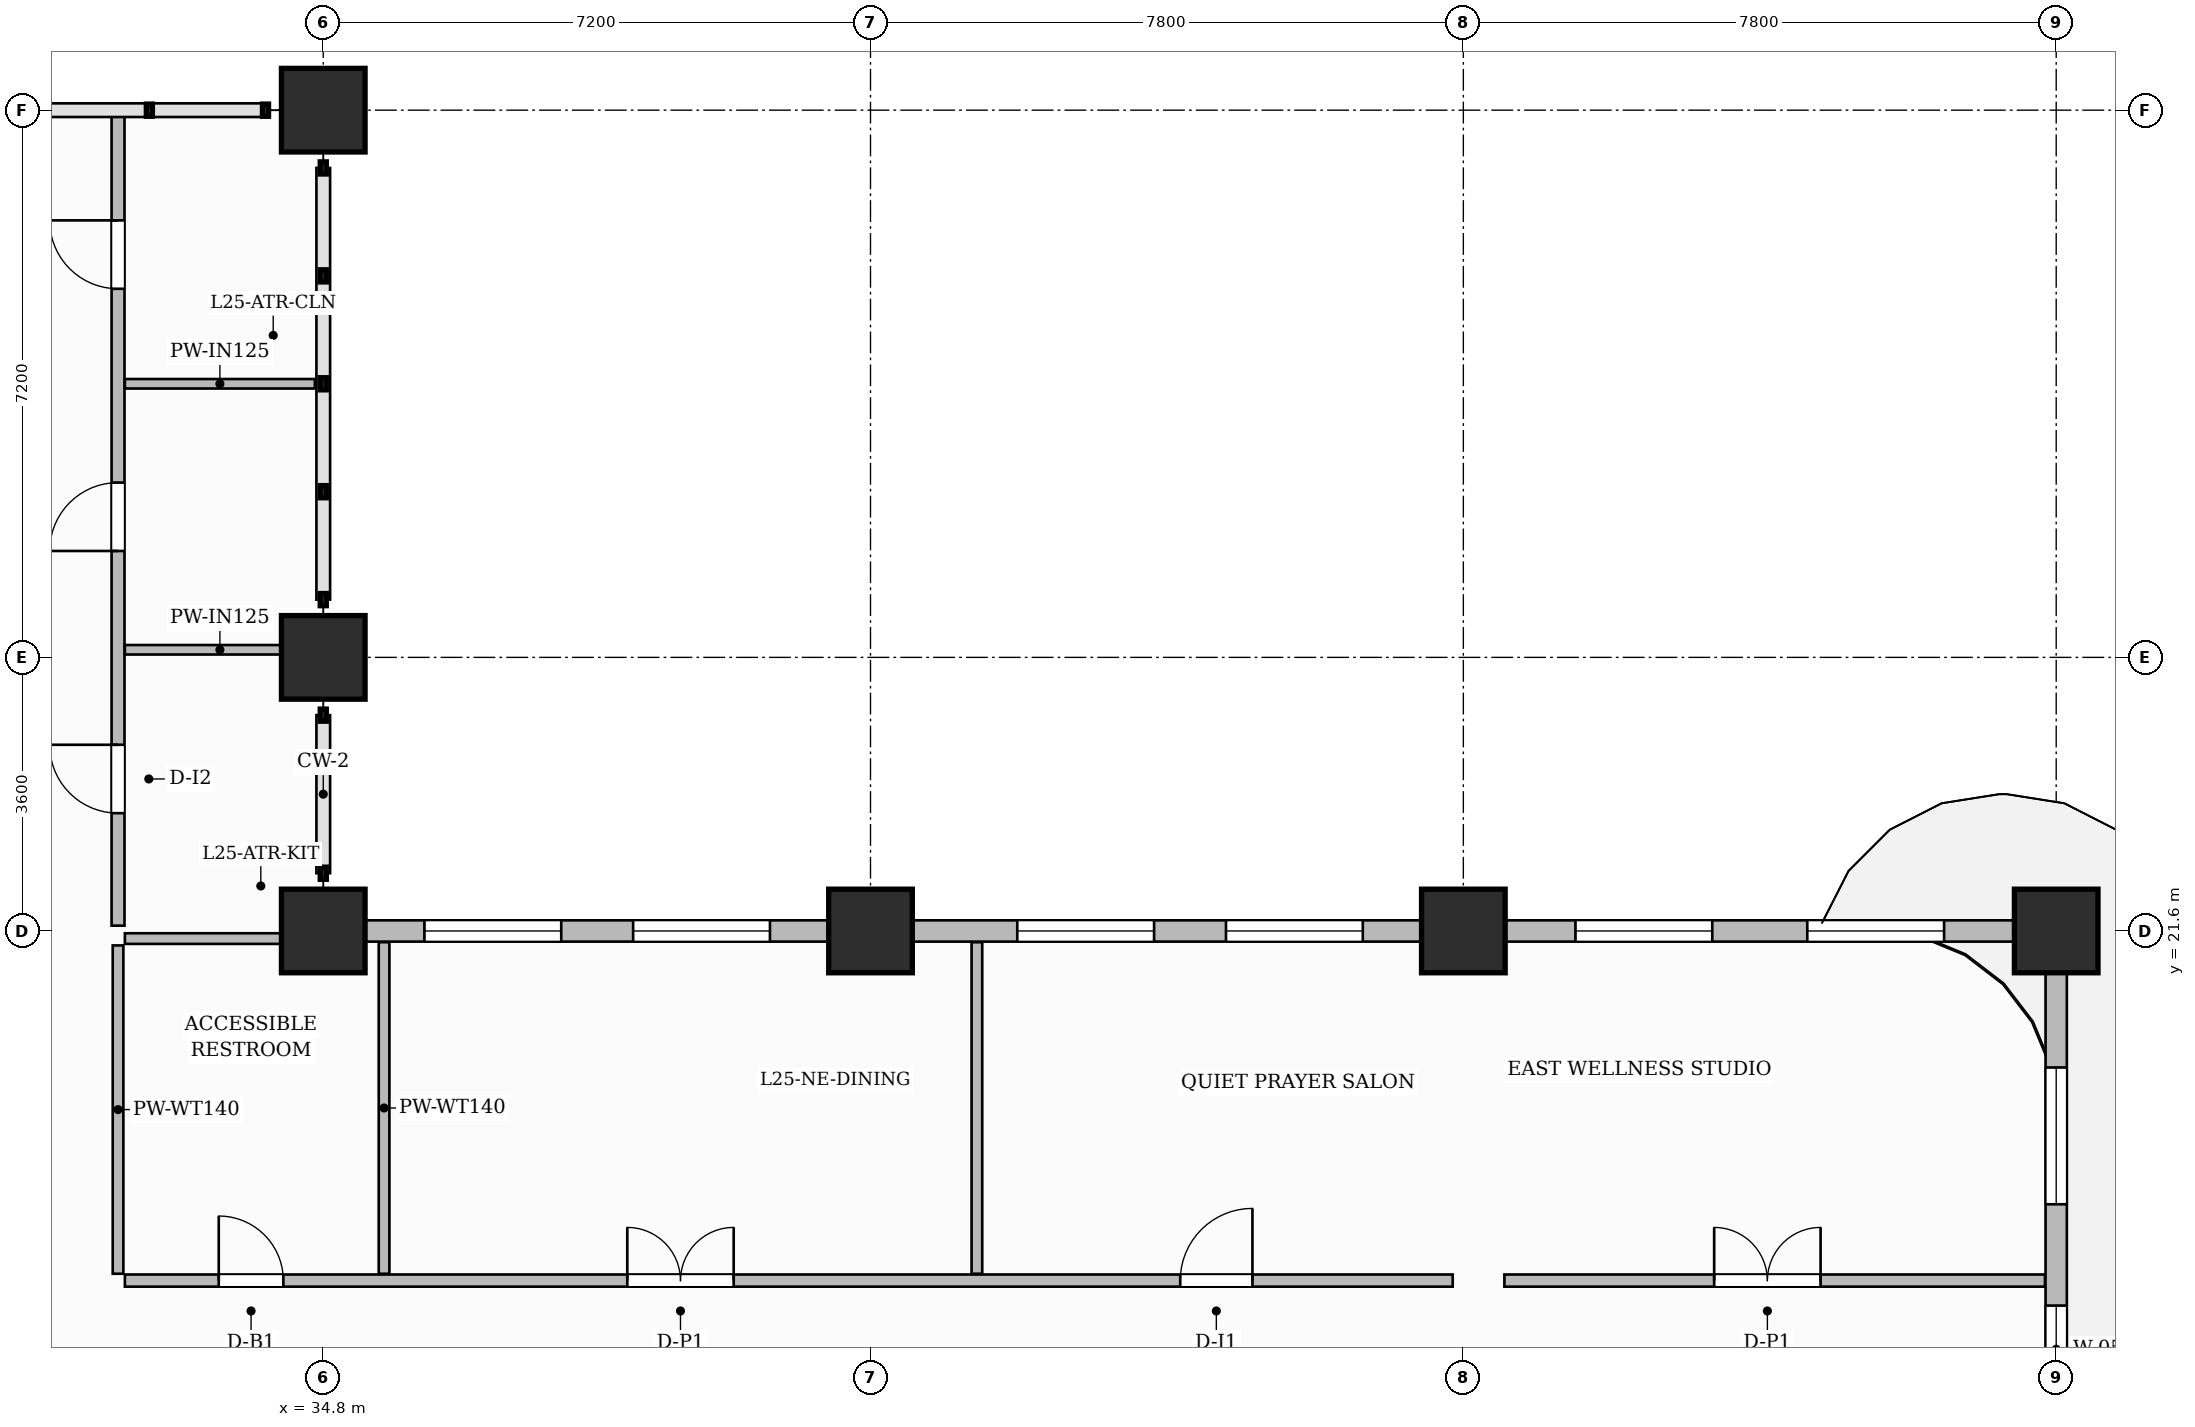
"""IFC4 building model, lengths in metres.
Left out: names, types, materials, properties, quantities, classifications, styles, units other than length and angle.
Written with IfcOpenShell. Run it as: python <this file> out.ifc"""

import sys

from ifc_helpers import new_model, si_unit, direction, frame, frame_2d, origin, origin_2d, place, context, subcontext, project, spatial, rectangle, extrude, source, transform, mapped, element, fill, save


model = new_model("IFC4")
c1 = context("Model", 3, precision=1e-05, world=origin(), true_north=direction((0.0, 1.0)))
c2 = subcontext(c1, "Body", "Model", "MODEL_VIEW")
j1 = project(units=[si_unit("LENGTHUNIT", "METRE"), si_unit("PLANEANGLEUNIT", "RADIAN")], contexts=[c1])
p1 = place(None, origin())
s1 = spatial("IfcSite", under=j1, at=p1, CompositionType="ELEMENT")
p2 = place(p1, origin())
s2 = spatial("IfcBuilding", under=s1, at=p2, CompositionType="ELEMENT")
p3 = place(p2, frame((0.0, 0.0, 102.7)))
s3 = spatial("IfcBuildingStorey", under=s2, at=p3, CompositionType="ELEMENT", Elevation=102.7)
m1 = source(origin(), c2, "Body", "SweptSolid", [
    extrude(rectangle(XDim=1.1, YDim=1.1, at=origin_2d()), origin(), (0.0, 0.0, 1.0), 3.7),
])
for number, where, z_axis, x_axis in (
    (1, (34.8, 21.6, 0.0), (0.0, 0.0, 1.0), (1.0, 0.0, 0.0)),
    (2, (34.8, 25.2, 0.0), (0.0, 0.0, 1.0), (1.0, 0.0, 0.0)),
    (3, (34.8, 32.4, 0.0), (0.0, 0.0, 1.0), (1.0, 0.0, 0.0)),
    (4, (42.0, 21.6, 0.0), (0.0, 0.0, 1.0), (1.0, 0.0, 0.0)),
    (5, (49.8, 21.6, 0.0), (0.0, 0.0, 1.0), (1.0, 0.0, 0.0)),
    (6, (57.6, 21.6, 0.0), (0.0, 0.0, 1.0), (1.0, 0.0, 0.0)),
):
    element("IfcColumn", number, at=place(p3, frame(where, z_axis=z_axis, x_axis=x_axis)), inside=s3, PredefinedType="COLUMN", context=c2, shape_type="MappedRepresentation", body=[
        mapped(m1, transform((0.0, 0.0, 0.0), scale=1.0)),
    ])
p4 = place(p3, frame((32.19, 17.0, 0.0), z_axis=(0.0, 0.0, 1.0), x_axis=(1.0, 0.0, 0.0)))
e7 = element("IfcWall", 7, at=p4, inside=s3, PredefinedType="PARTITIONING", context=c2, shape_type="SweptSolid", body=[
    extrude(rectangle(XDim=17.47, YDim=0.16, at=frame_2d((8.735, 0.0))), origin(), (0.0, 0.0, 1.0), 3.4),
])
p5 = place(p4, frame((1.235, 0.0, 0.0)))
e8 = element("IfcOpeningElement", 8, at=p5, cuts=e7, PredefinedType="OPENING", context=c2, shape_type="SweptSolid", body=[
    extrude(rectangle(XDim=0.85, YDim=2.1, at=frame_2d((0.425, 1.05))), frame((0.0, 0.09, 0.0), z_axis=(0.0, -1.0, 0.0), x_axis=(1.0, 0.0, 0.0)), (0.0, 0.0, 1.0), 0.18),
])
p6 = place(p4, frame((6.61, 0.0, 0.0)))
e9 = element("IfcOpeningElement", 9, at=p6, cuts=e7, PredefinedType="OPENING", context=c2, shape_type="SweptSolid", body=[
    extrude(rectangle(XDim=1.4, YDim=2.35, at=frame_2d((0.7, 1.175))), frame((0.0, 0.09, 0.0), z_axis=(0.0, -1.0, 0.0), x_axis=(1.0, 0.0, 0.0)), (0.0, 0.0, 1.0), 0.18),
])
p7 = place(p4, frame((13.885, 0.0, 0.0)))
e10 = element("IfcOpeningElement", 10, at=p7, cuts=e7, PredefinedType="OPENING", context=c2, shape_type="SweptSolid", body=[
    extrude(rectangle(XDim=0.95, YDim=2.15, at=frame_2d((0.475, 1.075))), frame((0.0, 0.09, 0.0), z_axis=(0.0, -1.0, 0.0), x_axis=(1.0, 0.0, 0.0)), (0.0, 0.0, 1.0), 0.18),
])
p8 = place(p3, frame((50.34, 17.0, 0.0), z_axis=(0.0, 0.0, 1.0), x_axis=(1.0, 0.0, 0.0)))
e11 = element("IfcWall", 11, at=p8, inside=s3, PredefinedType="PARTITIONING", context=c2, shape_type="SweptSolid", body=[
    extrude(rectangle(XDim=7.112, YDim=0.16, at=frame_2d((3.556, 0.0))), origin(), (0.0, 0.0, 1.0), 3.4),
])
p9 = place(p8, frame((2.76, 0.0, 0.0)))
e12 = element("IfcOpeningElement", 12, at=p9, cuts=e11, PredefinedType="OPENING", context=c2, shape_type="SweptSolid", body=[
    extrude(rectangle(XDim=1.4, YDim=2.35, at=frame_2d((0.7, 1.175))), frame((0.0, 0.09, 0.0), z_axis=(0.0, -1.0, 0.0), x_axis=(1.0, 0.0, 0.0)), (0.0, 0.0, 1.0), 0.18),
])
p10 = place(p3, frame((32.1, 17.09, 0.0), z_axis=(0.0, 0.0, 1.0), x_axis=(0.0, 1.0, 0.0)))
e13 = element("IfcWall", 13, at=p10, inside=s3, PredefinedType="PARTITIONING", context=c2, shape_type="SweptSolid", body=[
    extrude(rectangle(XDim=4.32, YDim=0.14, at=frame_2d((2.16, 0.0))), origin(), (0.0, 0.0, 1.0), 3.4),
])
for number, where, z_axis, x_axis in (
    (14, (35.6, 17.09, 0.0), (0.0, 0.0, 1.0), (0.0, 1.0, 0.0)),
    (15, (43.4, 17.09, 0.0), (0.0, 0.0, 1.0), (0.0, 1.0, 0.0)),
):
    element("IfcWall", number, at=place(p3, frame(where, z_axis=z_axis, x_axis=x_axis)), inside=s3, PredefinedType="PARTITIONING", context=c2, shape_type="SweptSolid", body=[
        extrude(rectangle(XDim=4.362, YDim=0.14, at=frame_2d((2.181, 0.0))), origin(), (0.0, 0.0, 1.0), 3.4),
    ])
p11 = place(p3, frame((32.19, 21.5, 0.0), z_axis=(0.0, 0.0, 1.0), x_axis=(1.0, 0.0, 0.0)))
e16 = element("IfcWall", 16, at=p11, inside=s3, PredefinedType="PARTITIONING", context=c2, shape_type="SweptSolid", body=[
    extrude(rectangle(XDim=2.42, YDim=0.14, at=frame_2d((1.21, 0.0))), origin(), (0.0, 0.0, 1.0), 2.835),
])
p12 = place(p3, frame((32.1, 21.67, 0.0), z_axis=(0.0, 0.0, 1.0), x_axis=(0.0, 1.0, 0.0)))
e17 = element("IfcWall", 17, at=p12, inside=s3, PredefinedType="PARTITIONING", context=c2, shape_type="SweptSolid", body=[
    extrude(rectangle(XDim=10.702, YDim=0.17, at=frame_2d((5.351, 0.0))), origin(), (0.0, 0.0, 1.0), 3.4),
])
p13 = place(p12, frame((1.48, 0.0, 0.0)))
e18 = element("IfcOpeningElement", 18, at=p13, cuts=e17, PredefinedType="OPENING", context=c2, shape_type="SweptSolid", body=[
    extrude(rectangle(XDim=0.9, YDim=2.15, at=frame_2d((0.45, 1.075))), frame((0.0, 0.095, 0.0), z_axis=(0.0, -1.0, 0.0), x_axis=(1.0, 0.0, 0.0)), (0.0, 0.0, 1.0), 0.19),
])
p14 = place(p12, frame((4.93, 0.0, 0.0)))
e19 = element("IfcOpeningElement", 19, at=p14, cuts=e17, PredefinedType="OPENING", context=c2, shape_type="SweptSolid", body=[
    extrude(rectangle(XDim=0.9, YDim=2.15, at=frame_2d((0.45, 1.075))), frame((0.0, 0.095, 0.0), z_axis=(0.0, -1.0, 0.0), x_axis=(1.0, 0.0, 0.0)), (0.0, 0.0, 1.0), 0.19),
])
p15 = place(p12, frame((8.38, 0.0, 0.0)))
e20 = element("IfcOpeningElement", 20, at=p15, cuts=e17, PredefinedType="OPENING", context=c2, shape_type="SweptSolid", body=[
    extrude(rectangle(XDim=0.9, YDim=2.15, at=frame_2d((0.45, 1.075))), frame((0.0, 0.095, 0.0), z_axis=(0.0, -1.0, 0.0), x_axis=(1.0, 0.0, 0.0)), (0.0, 0.0, 1.0), 0.19),
])
for number, where, z_axis, x_axis in (
    (21, (32.19, 25.3, 0.0), (0.0, 0.0, 1.0), (1.0, 0.0, 0.0)),
    (22, (32.19, 28.8, 0.0), (0.0, 0.0, 1.0), (1.0, 0.0, 0.0)),
):
    element("IfcWall", number, at=place(p3, frame(where, z_axis=z_axis, x_axis=x_axis)), inside=s3, PredefinedType="PARTITIONING", context=c2, shape_type="SweptSolid", body=[
        extrude(rectangle(XDim=2.5, YDim=0.125, at=frame_2d((1.25, 0.0))), origin(), (0.0, 0.0, 1.0), 3.4),
    ])
p16 = place(p3, frame((57.6, 0.05, 0.0), z_axis=(0.0, 0.0, 1.0), x_axis=(0.0, 1.0, 0.0)))
e23 = element("IfcWall", 23, at=p16, inside=s3, PredefinedType="SOLIDWALL", context=c2, shape_type="SweptSolid", body=[
    extrude(rectangle(XDim=21.5, YDim=0.28, at=frame_2d((10.75, 0.0))), origin(), (0.0, 0.0, 1.0), 2.835),
])
p17 = place(p16, frame((2.75, 0.0, 0.0)))
e24 = element("IfcOpeningElement", 24, at=p17, cuts=e23, PredefinedType="OPENING", context=c2, shape_type="SweptSolid", body=[
    extrude(rectangle(XDim=1.2, YDim=2.2, at=frame_2d((0.6, 1.1))), frame((0.0, 0.15, 0.0), z_axis=(0.0, -1.0, 0.0), x_axis=(1.0, 0.0, 0.0)), (0.0, 0.0, 1.0), 0.3),
])
p18 = place(p16, frame((1.025, 0.0, 0.8)))
e25 = element("IfcOpeningElement", 25, at=p18, cuts=e23, PredefinedType="OPENING", context=c2, shape_type="SweptSolid", body=[
    extrude(rectangle(XDim=1.15, YDim=1.8, at=frame_2d((0.575, 0.9))), frame((0.0, 0.15, 0.0), z_axis=(0.0, -1.0, 0.0), x_axis=(1.0, 0.0, 0.0)), (0.0, 0.0, 1.0), 0.3),
])
p19 = place(p16, frame((4.6, 0.0, 0.8)))
e26 = element("IfcOpeningElement", 26, at=p19, cuts=e23, PredefinedType="OPENING", context=c2, shape_type="SweptSolid", body=[
    extrude(rectangle(XDim=1.4, YDim=1.85, at=frame_2d((0.7, 0.925))), frame((0.0, 0.15, 0.0), z_axis=(0.0, -1.0, 0.0), x_axis=(1.0, 0.0, 0.0)), (0.0, 0.0, 1.0), 0.3),
])
p20 = place(p16, frame((8.475, 0.0, 0.8)))
e27 = element("IfcOpeningElement", 27, at=p20, cuts=e23, PredefinedType="OPENING", context=c2, shape_type="SweptSolid", body=[
    extrude(rectangle(XDim=1.8, YDim=1.85, at=frame_2d((0.9, 0.925))), frame((0.0, 0.15, 0.0), z_axis=(0.0, -1.0, 0.0), x_axis=(1.0, 0.0, 0.0)), (0.0, 0.0, 1.0), 0.3),
])
p21 = place(p16, frame((11.225, 0.0, 0.8)))
e28 = element("IfcOpeningElement", 28, at=p21, cuts=e23, PredefinedType="OPENING", context=c2, shape_type="SweptSolid", body=[
    extrude(rectangle(XDim=1.8, YDim=1.85, at=frame_2d((0.9, 0.925))), frame((0.0, 0.15, 0.0), z_axis=(0.0, -1.0, 0.0), x_axis=(1.0, 0.0, 0.0)), (0.0, 0.0, 1.0), 0.3),
])
p22 = place(p16, frame((15.471, 0.0, 0.8)))
e29 = element("IfcOpeningElement", 29, at=p22, cuts=e23, PredefinedType="OPENING", context=c2, shape_type="SweptSolid", body=[
    extrude(rectangle(XDim=1.15, YDim=1.8, at=frame_2d((0.575, 0.9))), frame((0.0, 0.15, 0.0), z_axis=(0.0, -1.0, 0.0), x_axis=(1.0, 0.0, 0.0)), (0.0, 0.0, 1.0), 0.3),
])
p23 = place(p16, frame((17.954, 0.0, 0.8)))
e30 = element("IfcOpeningElement", 30, at=p23, cuts=e23, PredefinedType="OPENING", context=c2, shape_type="SweptSolid", body=[
    extrude(rectangle(XDim=1.8, YDim=1.85, at=frame_2d((0.9, 0.925))), frame((0.0, 0.15, 0.0), z_axis=(0.0, -1.0, 0.0), x_axis=(1.0, 0.0, 0.0)), (0.0, 0.0, 1.0), 0.3),
])
p24 = place(p3, frame((34.8, 21.6, 0.0), z_axis=(0.0, 0.0, 1.0), x_axis=(1.0, 0.0, 0.0)))
e31 = element("IfcWall", 31, at=p24, inside=s3, PredefinedType="SOLIDWALL", context=c2, shape_type="SweptSolid", body=[
    extrude(rectangle(XDim=22.8, YDim=0.28, at=frame_2d((11.4, 0.0))), origin(), (0.0, 0.0, 1.0), 2.835),
])
p25 = place(p24, frame((1.331, 0.0, 0.8)))
e32 = element("IfcOpeningElement", 32, at=p25, cuts=e31, PredefinedType="OPENING", context=c2, shape_type="SweptSolid", body=[
    extrude(rectangle(XDim=1.8, YDim=1.85, at=frame_2d((0.9, 0.925))), frame((0.0, 0.15, 0.0), z_axis=(0.0, -1.0, 0.0), x_axis=(1.0, 0.0, 0.0)), (0.0, 0.0, 1.0), 0.3),
])
p26 = place(p24, frame((4.077, 0.0, 0.8)))
e33 = element("IfcOpeningElement", 33, at=p26, cuts=e31, PredefinedType="OPENING", context=c2, shape_type="SweptSolid", body=[
    extrude(rectangle(XDim=1.8, YDim=1.85, at=frame_2d((0.9, 0.925))), frame((0.0, 0.15, 0.0), z_axis=(0.0, -1.0, 0.0), x_axis=(1.0, 0.0, 0.0)), (0.0, 0.0, 1.0), 0.3),
])
p27 = place(p24, frame((9.131, 0.0, 0.8)))
e34 = element("IfcOpeningElement", 34, at=p27, cuts=e31, PredefinedType="OPENING", context=c2, shape_type="SweptSolid", body=[
    extrude(rectangle(XDim=1.8, YDim=1.85, at=frame_2d((0.9, 0.925))), frame((0.0, 0.15, 0.0), z_axis=(0.0, -1.0, 0.0), x_axis=(1.0, 0.0, 0.0)), (0.0, 0.0, 1.0), 0.3),
])
p28 = place(p24, frame((11.877, 0.0, 0.8)))
e35 = element("IfcOpeningElement", 35, at=p28, cuts=e31, PredefinedType="OPENING", context=c2, shape_type="SweptSolid", body=[
    extrude(rectangle(XDim=1.8, YDim=1.85, at=frame_2d((0.9, 0.925))), frame((0.0, 0.15, 0.0), z_axis=(0.0, -1.0, 0.0), x_axis=(1.0, 0.0, 0.0)), (0.0, 0.0, 1.0), 0.3),
])
p29 = place(p24, frame((16.475, 0.0, 0.8)))
e36 = element("IfcOpeningElement", 36, at=p29, cuts=e31, PredefinedType="OPENING", context=c2, shape_type="SweptSolid", body=[
    extrude(rectangle(XDim=1.8, YDim=1.85, at=frame_2d((0.9, 0.925))), frame((0.0, 0.15, 0.0), z_axis=(0.0, -1.0, 0.0), x_axis=(1.0, 0.0, 0.0)), (0.0, 0.0, 1.0), 0.3),
])
p30 = place(p24, frame((19.525, 0.0, 0.8)))
e37 = element("IfcOpeningElement", 37, at=p30, cuts=e31, PredefinedType="OPENING", context=c2, shape_type="SweptSolid", body=[
    extrude(rectangle(XDim=1.8, YDim=1.85, at=frame_2d((0.9, 0.925))), frame((0.0, 0.15, 0.0), z_axis=(0.0, -1.0, 0.0), x_axis=(1.0, 0.0, 0.0)), (0.0, 0.0, 1.0), 0.3),
])
m2 = source(origin(), c2, "Body", "SweptSolid", [
    extrude(rectangle(XDim=1.4, YDim=2.35, at=frame_2d((0.7, 1.175))), frame((0.0, 0.025, 0.0), z_axis=(0.0, -1.0, 0.0), x_axis=(1.0, 0.0, 0.0)), (0.0, 0.0, 1.0), 0.05),
])
p31 = place(p9, origin())
e38 = element("IfcDoor", 38, at=p31, inside=s3, OperationType="DOUBLE_DOOR_SINGLE_SWING", PredefinedType="DOOR", context=c2, shape_type="MappedRepresentation", body=[
    mapped(m2, transform((0.0, 0.0, 0.0), scale=1.0)),
])
fill(e12, e38)
m3 = source(origin(), c2, "Body", "SweptSolid", [
    extrude(rectangle(XDim=0.85, YDim=2.1, at=frame_2d((0.425, 1.05))), frame((0.0, 0.025, 0.0), z_axis=(0.0, -1.0, 0.0), x_axis=(1.0, 0.0, 0.0)), (0.0, 0.0, 1.0), 0.05),
])
p32 = place(p5, origin())
e39 = element("IfcDoor", 39, at=p32, inside=s3, OperationType="SINGLE_SWING_LEFT", PredefinedType="DOOR", context=c2, shape_type="MappedRepresentation", body=[
    mapped(m3, transform((0.0, 0.0, 0.0), scale=1.0)),
])
fill(e8, e39)
p33 = place(p6, origin())
e40 = element("IfcDoor", 40, at=p33, inside=s3, OperationType="DOUBLE_DOOR_SINGLE_SWING", PredefinedType="DOOR", context=c2, shape_type="MappedRepresentation", body=[
    mapped(m2, transform((0.0, 0.0, 0.0), scale=1.0)),
])
fill(e9, e40)
m4 = source(origin(), c2, "Body", "SweptSolid", [
    extrude(rectangle(XDim=0.95, YDim=2.15, at=frame_2d((0.475, 1.075))), frame((0.0, 0.025, 0.0), z_axis=(0.0, -1.0, 0.0), x_axis=(1.0, 0.0, 0.0)), (0.0, 0.0, 1.0), 0.05),
])
p34 = place(p7, origin())
e41 = element("IfcDoor", 41, at=p34, inside=s3, OperationType="SINGLE_SWING_RIGHT", PredefinedType="DOOR", context=c2, shape_type="MappedRepresentation", body=[
    mapped(m4, transform((0.0, 0.0, 0.0), scale=1.0)),
])
fill(e10, e41)
m5 = source(origin(), c2, "Body", "SweptSolid", [
    extrude(rectangle(XDim=0.9, YDim=2.15, at=frame_2d((0.45, 1.075))), frame((0.0, 0.025, 0.0), z_axis=(0.0, -1.0, 0.0), x_axis=(1.0, 0.0, 0.0)), (0.0, 0.0, 1.0), 0.05),
])
p35 = place(p13, origin())
e42 = element("IfcDoor", 42, at=p35, inside=s3, OperationType="SINGLE_SWING_RIGHT", PredefinedType="DOOR", context=c2, shape_type="MappedRepresentation", body=[
    mapped(m5, transform((0.0, 0.0, 0.0), scale=1.0)),
])
fill(e18, e42)
p36 = place(p14, origin())
e43 = element("IfcDoor", 43, at=p36, inside=s3, OperationType="SINGLE_SWING_LEFT", PredefinedType="DOOR", context=c2, shape_type="MappedRepresentation", body=[
    mapped(m5, transform((0.0, 0.0, 0.0), scale=1.0)),
])
fill(e19, e43)
p37 = place(p15, origin())
e44 = element("IfcDoor", 44, at=p37, inside=s3, OperationType="SINGLE_SWING_RIGHT", PredefinedType="DOOR", context=c2, shape_type="MappedRepresentation", body=[
    mapped(m5, transform((0.0, 0.0, 0.0), scale=1.0)),
])
fill(e20, e44)
m6 = source(origin(), c2, "Body", "SweptSolid", [
    extrude(rectangle(XDim=1.15, YDim=1.8, at=frame_2d((0.575, 0.9))), frame((0.0, 0.03, 0.0), z_axis=(0.0, -1.0, 0.0), x_axis=(1.0, 0.0, 0.0)), (0.0, 0.0, 1.0), 0.06),
])
p38 = place(p22, origin())
e45 = element("IfcWindow", 45, at=p38, inside=s3, PartitioningType="SINGLE_PANEL", PredefinedType="WINDOW", context=c2, shape_type="MappedRepresentation", body=[
    mapped(m6, transform((0.0, 0.0, 0.0), scale=1.0)),
])
fill(e29, e45)
m7 = source(origin(), c2, "Body", "SweptSolid", [
    extrude(rectangle(XDim=1.8, YDim=1.85, at=frame_2d((0.9, 0.925))), frame((0.0, 0.03, 0.0), z_axis=(0.0, -1.0, 0.0), x_axis=(1.0, 0.0, 0.0)), (0.0, 0.0, 1.0), 0.06),
])
p39 = place(p23, origin())
e46 = element("IfcWindow", 46, at=p39, inside=s3, PartitioningType="DOUBLE_PANEL_VERTICAL", PredefinedType="WINDOW", context=c2, shape_type="MappedRepresentation", body=[
    mapped(m7, transform((0.0, 0.0, 0.0), scale=1.0)),
])
fill(e30, e46)
p40 = place(p25, origin())
e47 = element("IfcWindow", 47, at=p40, inside=s3, PartitioningType="DOUBLE_PANEL_VERTICAL", PredefinedType="WINDOW", context=c2, shape_type="MappedRepresentation", body=[
    mapped(m7, transform((0.0, 0.0, 0.0), scale=1.0)),
])
fill(e32, e47)
p41 = place(p26, origin())
e48 = element("IfcWindow", 48, at=p41, inside=s3, PartitioningType="DOUBLE_PANEL_VERTICAL", PredefinedType="WINDOW", context=c2, shape_type="MappedRepresentation", body=[
    mapped(m7, transform((0.0, 0.0, 0.0), scale=1.0)),
])
fill(e33, e48)
p42 = place(p27, origin())
e49 = element("IfcWindow", 49, at=p42, inside=s3, PartitioningType="DOUBLE_PANEL_VERTICAL", PredefinedType="WINDOW", context=c2, shape_type="MappedRepresentation", body=[
    mapped(m7, transform((0.0, 0.0, 0.0), scale=1.0)),
])
fill(e34, e49)
p43 = place(p28, origin())
e50 = element("IfcWindow", 50, at=p43, inside=s3, PartitioningType="DOUBLE_PANEL_VERTICAL", PredefinedType="WINDOW", context=c2, shape_type="MappedRepresentation", body=[
    mapped(m7, transform((0.0, 0.0, 0.0), scale=1.0)),
])
fill(e35, e50)
p44 = place(p29, origin())
e51 = element("IfcWindow", 51, at=p44, inside=s3, PartitioningType="DOUBLE_PANEL_VERTICAL", PredefinedType="WINDOW", context=c2, shape_type="MappedRepresentation", body=[
    mapped(m7, transform((0.0, 0.0, 0.0), scale=1.0)),
])
fill(e36, e51)
p45 = place(p30, origin())
e52 = element("IfcWindow", 52, at=p45, inside=s3, PartitioningType="DOUBLE_PANEL_VERTICAL", PredefinedType="WINDOW", context=c2, shape_type="MappedRepresentation", body=[
    mapped(m7, transform((0.0, 0.0, 0.0), scale=1.0)),
])
fill(e37, e52)
save(model, sys.argv[1])
